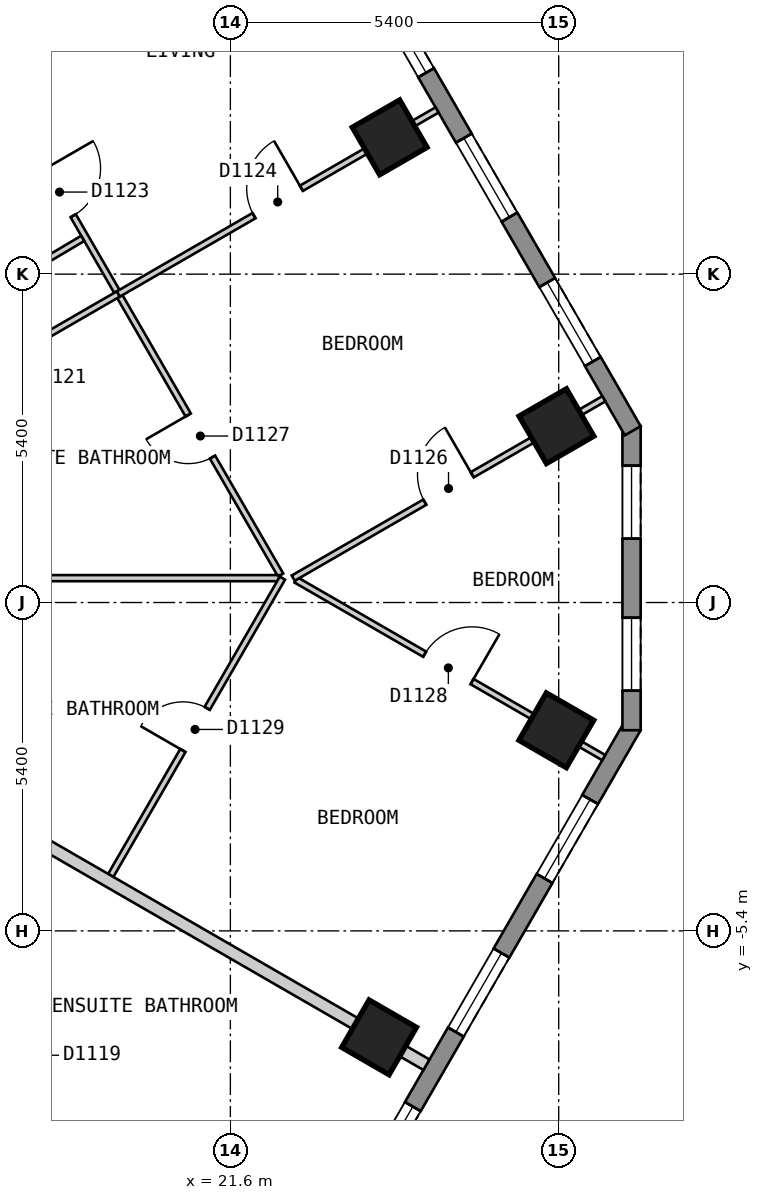
"""IFC4 building model, lengths in metres.
Left out: names, types, materials, properties, quantities, classifications, styles, units other than length and angle.
Written with IfcOpenShell. Run it as: python <this file> out.ifc"""

import sys

from ifc_helpers import new_model, si_unit, direction, frame, frame_2d, origin, origin_2d, place, context, subcontext, project, spatial, polyline, rectangle, outline, extrude, element, fill, save


model = new_model("IFC4")
c1 = context("Model", 3, precision=1e-05, world=origin(), true_north=direction((0.0, 1.0)))
c2 = subcontext(c1, "Body", "Model", "MODEL_VIEW")
j1 = project(units=[si_unit("LENGTHUNIT", "METRE"), si_unit("PLANEANGLEUNIT", "RADIAN")], contexts=[c1])
p1 = place(None, origin())
s1 = spatial("IfcSite", under=j1, at=p1, CompositionType="ELEMENT")
p2 = place(p1, origin())
s2 = spatial("IfcBuilding", under=s1, at=p2, CompositionType="ELEMENT")
p3 = place(p2, frame((0.0, 0.0, 150.6)))
s3 = spatial("IfcBuildingStorey", under=s2, at=p3, CompositionType="ELEMENT", Elevation=150.6)
for number, where, z_axis, x_axis in (
    (1, (24.046, -7.151, 0.0), (0.0, 0.0, 1.0), (0.5, 0.866, 0.0)),
    (2, (26.961, -2.101, 0.0), (0.0, 0.0, 1.0), (0.5, 0.866, 0.0)),
    (3, (26.963, 2.9, 0.0), (0.0, 0.0, 1.0), (-0.5, 0.866, 0.0)),
    (4, (24.22, 7.65, 0.0), (0.0, 0.0, 1.0), (-0.5, 0.866, 0.0)),
):
    element("IfcColumn", number, at=place(p3, frame(where, z_axis=z_axis, x_axis=x_axis)), inside=s3, PredefinedType="COLUMN", context=c2, shape_type="SweptSolid", body=[
        extrude(rectangle(XDim=0.9, YDim=0.9, at=origin_2d()), origin(), (0.0, 0.0, 1.0), 3.0),
    ])
p4 = place(p3, frame((15.862, -23.425, 0.0), z_axis=(0.0, 0.0, 1.0), x_axis=(0.500017503135, 0.866015298109, 0.0)))
e5 = element("IfcWall", 5, at=p4, inside=s3, PredefinedType="SOLIDWALL", context=c2, shape_type="SweptSolid", body=[
    extrude(outline(polyline([(0.0, -0.15), (24.711, -0.15), (24.631, 0.15), (0.08, 0.15), (0.0, -0.15)])), origin(), (0.0, 0.0, 1.0), 2.6),
])
p5 = place(p4, frame((1.4, 0.0, 0.15)))
e6 = element("IfcOpeningElement", 6, at=p5, cuts=e5, PredefinedType="OPENING", context=c2, shape_type="SweptSolid", body=[
    extrude(rectangle(XDim=1.5, YDim=2.1, at=frame_2d((0.75, 1.05))), frame((0.0, 0.16, 0.0), z_axis=(0.0, -1.0, 0.0), x_axis=(1.0, 0.0, 0.0)), (0.0, 0.0, 1.0), 0.32),
])
p6 = place(p4, frame((4.316, 0.0, 0.15)))
e7 = element("IfcOpeningElement", 7, at=p6, cuts=e5, PredefinedType="OPENING", context=c2, shape_type="SweptSolid", body=[
    extrude(rectangle(XDim=1.5, YDim=2.1, at=frame_2d((0.75, 1.05))), frame((0.0, 0.16, 0.0), z_axis=(0.0, -1.0, 0.0), x_axis=(1.0, 0.0, 0.0)), (0.0, 0.0, 1.0), 0.32),
])
p7 = place(p4, frame((7.231, 0.0, 0.15)))
e8 = element("IfcOpeningElement", 8, at=p7, cuts=e5, PredefinedType="OPENING", context=c2, shape_type="SweptSolid", body=[
    extrude(rectangle(XDim=1.5, YDim=2.1, at=frame_2d((0.75, 1.05))), frame((0.0, 0.16, 0.0), z_axis=(0.0, -1.0, 0.0), x_axis=(1.0, 0.0, 0.0)), (0.0, 0.0, 1.0), 0.32),
])
p8 = place(p4, frame((10.147, 0.0, 0.15)))
e9 = element("IfcOpeningElement", 9, at=p8, cuts=e5, PredefinedType="OPENING", context=c2, shape_type="SweptSolid", body=[
    extrude(rectangle(XDim=1.5, YDim=2.1, at=frame_2d((0.75, 1.05))), frame((0.0, 0.16, 0.0), z_axis=(0.0, -1.0, 0.0), x_axis=(1.0, 0.0, 0.0)), (0.0, 0.0, 1.0), 0.32),
])
p9 = place(p4, frame((13.062, 0.0, 0.15)))
e10 = element("IfcOpeningElement", 10, at=p9, cuts=e5, PredefinedType="OPENING", context=c2, shape_type="SweptSolid", body=[
    extrude(rectangle(XDim=1.5, YDim=2.1, at=frame_2d((0.75, 1.05))), frame((0.0, 0.16, 0.0), z_axis=(0.0, -1.0, 0.0), x_axis=(1.0, 0.0, 0.0)), (0.0, 0.0, 1.0), 0.32),
])
p10 = place(p4, frame((15.977, 0.0, 0.15)))
e11 = element("IfcOpeningElement", 11, at=p10, cuts=e5, PredefinedType="OPENING", context=c2, shape_type="SweptSolid", body=[
    extrude(rectangle(XDim=1.5, YDim=2.1, at=frame_2d((0.75, 1.05))), frame((0.0, 0.16, 0.0), z_axis=(0.0, -1.0, 0.0), x_axis=(1.0, 0.0, 0.0)), (0.0, 0.0, 1.0), 0.32),
])
p11 = place(p4, frame((18.893, 0.0, 0.15)))
e12 = element("IfcOpeningElement", 12, at=p11, cuts=e5, PredefinedType="OPENING", context=c2, shape_type="SweptSolid", body=[
    extrude(rectangle(XDim=1.5, YDim=2.1, at=frame_2d((0.75, 1.05))), frame((0.0, 0.16, 0.0), z_axis=(0.0, -1.0, 0.0), x_axis=(1.0, 0.0, 0.0)), (0.0, 0.0, 1.0), 0.32),
])
p12 = place(p4, frame((21.809, 0.0, 0.15)))
e13 = element("IfcOpeningElement", 13, at=p12, cuts=e5, PredefinedType="OPENING", context=c2, shape_type="SweptSolid", body=[
    extrude(rectangle(XDim=1.5, YDim=2.1, at=frame_2d((0.75, 1.05))), frame((0.0, 0.16, 0.0), z_axis=(0.0, -1.0, 0.0), x_axis=(1.0, 0.0, 0.0)), (0.0, 0.0, 1.0), 0.32),
])
p13 = place(p3, frame((28.198, -2.1, 0.0), z_axis=(0.0, 0.0, 1.0), x_axis=(0.0, 1.0, 0.0)))
e14 = element("IfcWall", 14, at=p13, inside=s3, PredefinedType="SOLIDWALL", context=c2, shape_type="SweptSolid", body=[
    extrude(outline(polyline([(0.0, -0.15), (5.0, -0.15), (4.92, 0.15), (0.08, 0.15), (0.0, -0.15)])), origin(), (0.0, 0.0, 1.0), 2.6),
])
p14 = place(p13, frame((0.65, 0.0, 0.15)))
e15 = element("IfcOpeningElement", 15, at=p14, cuts=e14, PredefinedType="OPENING", context=c2, shape_type="SweptSolid", body=[
    extrude(rectangle(XDim=1.2, YDim=2.1, at=frame_2d((0.6, 1.05))), frame((0.0, 0.16, 0.0), z_axis=(0.0, -1.0, 0.0), x_axis=(1.0, 0.0, 0.0)), (0.0, 0.0, 1.0), 0.32),
])
p15 = place(p13, frame((3.15, 0.0, 0.15)))
e16 = element("IfcOpeningElement", 16, at=p15, cuts=e14, PredefinedType="OPENING", context=c2, shape_type="SweptSolid", body=[
    extrude(rectangle(XDim=1.2, YDim=2.1, at=frame_2d((0.6, 1.05))), frame((0.0, 0.16, 0.0), z_axis=(0.0, -1.0, 0.0), x_axis=(1.0, 0.0, 0.0)), (0.0, 0.0, 1.0), 0.32),
])
p16 = place(p3, frame((28.218, 2.825, 0.0), z_axis=(0.0, 0.0, 1.0), x_axis=(-0.500020536353, 0.866013546791, 0.0)))
e17 = element("IfcWall", 17, at=p16, inside=s3, PredefinedType="SOLIDWALL", context=c2, shape_type="SweptSolid", body=[
    extrude(outline(polyline([(0.0, -0.15), (23.325, -0.15), (23.245, 0.15), (0.08, 0.15), (0.0, -0.15)])), origin(), (0.0, 0.0, 1.0), 2.6),
])
p17 = place(p16, frame((1.314, 0.0, 0.15)))
e18 = element("IfcOpeningElement", 18, at=p17, cuts=e17, PredefinedType="OPENING", context=c2, shape_type="SweptSolid", body=[
    extrude(rectangle(XDim=1.5, YDim=2.1, at=frame_2d((0.75, 1.05))), frame((0.0, 0.16, 0.0), z_axis=(0.0, -1.0, 0.0), x_axis=(1.0, 0.0, 0.0)), (0.0, 0.0, 1.0), 0.32),
])
p18 = place(p16, frame((4.056, 0.0, 0.15)))
e19 = element("IfcOpeningElement", 19, at=p18, cuts=e17, PredefinedType="OPENING", context=c2, shape_type="SweptSolid", body=[
    extrude(rectangle(XDim=1.5, YDim=2.1, at=frame_2d((0.75, 1.05))), frame((0.0, 0.16, 0.0), z_axis=(0.0, -1.0, 0.0), x_axis=(1.0, 0.0, 0.0)), (0.0, 0.0, 1.0), 0.32),
])
p19 = place(p16, frame((6.798, 0.0, 0.15)))
e20 = element("IfcOpeningElement", 20, at=p19, cuts=e17, PredefinedType="OPENING", context=c2, shape_type="SweptSolid", body=[
    extrude(rectangle(XDim=1.5, YDim=2.1, at=frame_2d((0.75, 1.05))), frame((0.0, 0.16, 0.0), z_axis=(0.0, -1.0, 0.0), x_axis=(1.0, 0.0, 0.0)), (0.0, 0.0, 1.0), 0.32),
])
p20 = place(p16, frame((9.541, 0.0, 0.15)))
e21 = element("IfcOpeningElement", 21, at=p20, cuts=e17, PredefinedType="OPENING", context=c2, shape_type="SweptSolid", body=[
    extrude(rectangle(XDim=1.5, YDim=2.1, at=frame_2d((0.75, 1.05))), frame((0.0, 0.16, 0.0), z_axis=(0.0, -1.0, 0.0), x_axis=(1.0, 0.0, 0.0)), (0.0, 0.0, 1.0), 0.32),
])
p21 = place(p16, frame((12.284, 0.0, 0.15)))
e22 = element("IfcOpeningElement", 22, at=p21, cuts=e17, PredefinedType="OPENING", context=c2, shape_type="SweptSolid", body=[
    extrude(rectangle(XDim=1.5, YDim=2.1, at=frame_2d((0.75, 1.05))), frame((0.0, 0.16, 0.0), z_axis=(0.0, -1.0, 0.0), x_axis=(1.0, 0.0, 0.0)), (0.0, 0.0, 1.0), 0.32),
])
p22 = place(p16, frame((15.027, 0.0, 0.15)))
e23 = element("IfcOpeningElement", 23, at=p22, cuts=e17, PredefinedType="OPENING", context=c2, shape_type="SweptSolid", body=[
    extrude(rectangle(XDim=1.5, YDim=2.1, at=frame_2d((0.75, 1.05))), frame((0.0, 0.16, 0.0), z_axis=(0.0, -1.0, 0.0), x_axis=(1.0, 0.0, 0.0)), (0.0, 0.0, 1.0), 0.32),
])
p23 = place(p16, frame((17.769, 0.0, 0.15)))
e24 = element("IfcOpeningElement", 24, at=p23, cuts=e17, PredefinedType="OPENING", context=c2, shape_type="SweptSolid", body=[
    extrude(rectangle(XDim=1.5, YDim=2.1, at=frame_2d((0.75, 1.05))), frame((0.0, 0.16, 0.0), z_axis=(0.0, -1.0, 0.0), x_axis=(1.0, 0.0, 0.0)), (0.0, 0.0, 1.0), 0.32),
])
p24 = place(p16, frame((20.511, 0.0, 0.15)))
e25 = element("IfcOpeningElement", 25, at=p24, cuts=e17, PredefinedType="OPENING", context=c2, shape_type="SweptSolid", body=[
    extrude(rectangle(XDim=1.5, YDim=2.1, at=frame_2d((0.75, 1.05))), frame((0.0, 0.16, 0.0), z_axis=(0.0, -1.0, 0.0), x_axis=(1.0, 0.0, 0.0)), (0.0, 0.0, 1.0), 0.32),
])
p25 = place(p3, frame((14.323, 14.487, 0.0), z_axis=(0.0, 0.0, 1.0), x_axis=(0.500011052545, -0.866019022501, 0.0)))
e26 = element("IfcWall", 26, at=p25, inside=s3, PredefinedType="PARTITIONING", context=c2, shape_type="SweptSolid", body=[
    extrude(rectangle(XDim=16.208, YDim=0.1, at=frame_2d((8.104, 0.0))), origin(), (0.0, 0.0, 1.0), 2.6),
])
p26 = place(p25, frame((8.484, 0.0, 0.0)))
e27 = element("IfcOpeningElement", 27, at=p26, cuts=e26, PredefinedType="OPENING", context=c2, shape_type="SweptSolid", body=[
    extrude(rectangle(XDim=0.9, YDim=2.1, at=frame_2d((0.45, 1.05))), frame((0.0, 0.06, 0.0), z_axis=(0.0, -1.0, 0.0), x_axis=(1.0, 0.0, 0.0)), (0.0, 0.0, 1.0), 0.12),
])
p27 = place(p25, frame((2.252, 0.0, 0.0)))
e28 = element("IfcOpeningElement", 28, at=p27, cuts=e26, PredefinedType="OPENING", context=c2, shape_type="SweptSolid", body=[
    extrude(rectangle(XDim=0.8, YDim=2.1, at=frame_2d((0.4, 1.05))), frame((0.0, 0.06, 0.0), z_axis=(0.0, -1.0, 0.0), x_axis=(1.0, 0.0, 0.0)), (0.0, 0.0, 1.0), 0.12),
])
p28 = place(p25, frame((13.167, 0.0, 0.0)))
e29 = element("IfcOpeningElement", 29, at=p28, cuts=e26, PredefinedType="OPENING", context=c2, shape_type="SweptSolid", body=[
    extrude(rectangle(XDim=0.8, YDim=2.1, at=frame_2d((0.4, 1.05))), frame((0.0, 0.06, 0.0), z_axis=(0.0, -1.0, 0.0), x_axis=(1.0, 0.0, 0.0)), (0.0, 0.0, 1.0), 0.12),
])
p29 = place(p3, frame((22.679, 0.372, 0.0), z_axis=(0.0, 0.0, 1.0), x_axis=(0.865985260119, -0.500069524424, 0.0)))
e30 = element("IfcWall", 30, at=p29, inside=s3, PredefinedType="PARTITIONING", context=c2, shape_type="SweptSolid", body=[
    extrude(rectangle(XDim=5.845, YDim=0.1, at=frame_2d((2.923, 0.0))), origin(), (0.0, 0.0, 1.0), 2.6),
])
p30 = place(p29, frame((2.444, 0.0, 0.0)))
e31 = element("IfcOpeningElement", 31, at=p30, cuts=e30, PredefinedType="OPENING", context=c2, shape_type="SweptSolid", body=[
    extrude(rectangle(XDim=0.9, YDim=2.1, at=frame_2d((0.45, 1.05))), frame((0.0, 0.06, 0.0), z_axis=(0.0, -1.0, 0.0), x_axis=(1.0, 0.0, 0.0)), (0.0, 0.0, 1.0), 0.12),
])
p31 = place(p3, frame((17.782, 0.401, 0.0), z_axis=(0.0, 0.0, 1.0), x_axis=(1.0, 0.0, 0.0)))
e32 = element("IfcWall", 32, at=p31, inside=s3, PredefinedType="PARTITIONING", context=c2, shape_type="SweptSolid", body=[
    extrude(rectangle(XDim=4.616, YDim=0.1, at=frame_2d((2.308, 0.0))), origin(), (0.0, 0.0, 1.0), 2.6),
])
p32 = place(p3, frame((19.633, -4.488, 0.0), z_axis=(0.0, 0.0, 1.0), x_axis=(0.500050624552, 0.865996173713, 0.0)))
e33 = element("IfcWall", 33, at=p32, inside=s3, PredefinedType="PARTITIONING", context=c2, shape_type="SweptSolid", body=[
    extrude(rectangle(XDim=5.646, YDim=0.1, at=frame_2d((2.823, 0.0))), origin(), (0.0, 0.0, 1.0), 2.6),
])
p33 = place(p32, frame((2.372, 0.0, 0.0)))
e34 = element("IfcOpeningElement", 34, at=p33, cuts=e33, PredefinedType="OPENING", context=c2, shape_type="SweptSolid", body=[
    extrude(rectangle(XDim=0.8, YDim=2.1, at=frame_2d((0.4, 1.05))), frame((0.0, 0.06, 0.0), z_axis=(0.0, -1.0, 0.0), x_axis=(1.0, 0.0, 0.0)), (0.0, 0.0, 1.0), 0.12),
])
p34 = place(p3, frame((16.339, 3.1, 0.0), z_axis=(0.0, 0.0, 1.0), x_axis=(0.866031112038, 0.499990112884, 0.0)))
e35 = element("IfcWall", 35, at=p34, inside=s3, PredefinedType="PARTITIONING", context=c2, shape_type="SweptSolid", body=[
    extrude(rectangle(XDim=3.948, YDim=0.1, at=frame_2d((1.974, 0.0))), origin(), (0.0, 0.0, 1.0), 2.6),
])
p35 = place(p3, frame((22.634, 0.401, 0.0), z_axis=(0.0, 0.0, 1.0), x_axis=(0.86601325737, 0.500021037617, 0.0)))
e36 = element("IfcWall", 36, at=p35, inside=s3, PredefinedType="PARTITIONING", context=c2, shape_type="SweptSolid", body=[
    extrude(rectangle(XDim=5.898, YDim=0.1, at=frame_2d((2.949, 0.0))), origin(), (0.0, 0.0, 1.0), 2.6),
])
p36 = place(p35, frame((2.499, 0.0, 0.0)))
e37 = element("IfcOpeningElement", 37, at=p36, cuts=e36, PredefinedType="OPENING", context=c2, shape_type="SweptSolid", body=[
    extrude(rectangle(XDim=0.9, YDim=2.1, at=frame_2d((0.45, 1.05))), frame((0.0, 0.06, 0.0), z_axis=(0.0, -1.0, 0.0), x_axis=(1.0, 0.0, 0.0)), (0.0, 0.0, 1.0), 0.12),
])
p37 = place(p3, frame((15.818, 4.002, 0.0), z_axis=(0.0, 0.0, 1.0), x_axis=(0.860457323494, 0.509522516132, 0.0)))
e38 = element("IfcWall", 38, at=p37, inside=s3, PredefinedType="PARTITIONING", context=c2, shape_type="SweptSolid", body=[
    extrude(rectangle(XDim=3.898, YDim=0.1, at=frame_2d((1.949, 0.0))), origin(), (0.0, 0.0, 1.0), 2.6),
])
p38 = place(p37, frame((1.524, 0.0, 0.0)))
e39 = element("IfcOpeningElement", 39, at=p38, cuts=e38, PredefinedType="OPENING", context=c2, shape_type="SweptSolid", body=[
    extrude(rectangle(XDim=0.8, YDim=2.1, at=frame_2d((0.4, 1.05))), frame((0.0, 0.06, 0.0), z_axis=(0.0, -1.0, 0.0), x_axis=(1.0, 0.0, 0.0)), (0.0, 0.0, 1.0), 0.12),
])
p39 = place(p3, frame((16.165, -2.601, 0.0), z_axis=(0.0, 0.0, 1.0), x_axis=(0.866016855193, -0.500014806302, 0.0)))
e40 = element("IfcWall", 40, at=p39, inside=s3, PredefinedType="PARTITIONING", context=c2, shape_type="SweptSolid", body=[
    extrude(rectangle(XDim=10.0, YDim=0.2, at=frame_2d((5.0, 0.0))), origin(), (0.0, 0.0, 1.0), 2.6),
])
p40 = place(p3, frame((19.758, 5.074, 0.0), z_axis=(0.0, 0.0, 1.0), x_axis=(0.866007554612, 0.500030914399, 0.0)))
e41 = element("IfcWall", 41, at=p40, inside=s3, PredefinedType="PARTITIONING", context=c2, shape_type="SweptSolid", body=[
    extrude(rectangle(XDim=6.052, YDim=0.1, at=frame_2d((3.026, 0.0))), origin(), (0.0, 0.0, 1.0), 2.6),
])
p41 = place(p40, frame((2.576, 0.0, 0.0)))
e42 = element("IfcOpeningElement", 42, at=p41, cuts=e41, PredefinedType="OPENING", context=c2, shape_type="SweptSolid", body=[
    extrude(rectangle(XDim=0.9, YDim=2.1, at=frame_2d((0.45, 1.05))), frame((0.0, 0.06, 0.0), z_axis=(0.0, -1.0, 0.0), x_axis=(1.0, 0.0, 0.0)), (0.0, 0.0, 1.0), 0.12),
])
p42 = place(p10, origin())
e43 = element("IfcWindow", 43, at=p42, inside=s3, PartitioningType="SINGLE_PANEL", PredefinedType="WINDOW", context=c2, shape_type="SweptSolid", body=[
    extrude(rectangle(XDim=1.5, YDim=2.1, at=frame_2d((0.75, 1.05))), frame((0.0, 0.03, 0.0), z_axis=(0.0, -1.0, 0.0), x_axis=(1.0, 0.0, 0.0)), (0.0, 0.0, 1.0), 0.06),
])
fill(e11, e43)
p43 = place(p11, origin())
e44 = element("IfcWindow", 44, at=p43, inside=s3, PartitioningType="SINGLE_PANEL", PredefinedType="WINDOW", context=c2, shape_type="SweptSolid", body=[
    extrude(rectangle(XDim=1.5, YDim=2.1, at=frame_2d((0.75, 1.05))), frame((0.0, 0.03, 0.0), z_axis=(0.0, -1.0, 0.0), x_axis=(1.0, 0.0, 0.0)), (0.0, 0.0, 1.0), 0.06),
])
fill(e12, e44)
p44 = place(p12, origin())
e45 = element("IfcWindow", 45, at=p44, inside=s3, PartitioningType="SINGLE_PANEL", PredefinedType="WINDOW", context=c2, shape_type="SweptSolid", body=[
    extrude(rectangle(XDim=1.5, YDim=2.1, at=frame_2d((0.75, 1.05))), frame((0.0, 0.03, 0.0), z_axis=(0.0, -1.0, 0.0), x_axis=(1.0, 0.0, 0.0)), (0.0, 0.0, 1.0), 0.06),
])
fill(e13, e45)
p45 = place(p14, origin())
e46 = element("IfcWindow", 46, at=p45, inside=s3, PartitioningType="SINGLE_PANEL", PredefinedType="WINDOW", context=c2, shape_type="SweptSolid", body=[
    extrude(rectangle(XDim=1.2, YDim=2.1, at=frame_2d((0.6, 1.05))), frame((0.0, 0.03, 0.0), z_axis=(0.0, -1.0, 0.0), x_axis=(1.0, 0.0, 0.0)), (0.0, 0.0, 1.0), 0.06),
])
fill(e15, e46)
p46 = place(p15, origin())
e47 = element("IfcWindow", 47, at=p46, inside=s3, PartitioningType="SINGLE_PANEL", PredefinedType="WINDOW", context=c2, shape_type="SweptSolid", body=[
    extrude(rectangle(XDim=1.2, YDim=2.1, at=frame_2d((0.6, 1.05))), frame((0.0, 0.03, 0.0), z_axis=(0.0, -1.0, 0.0), x_axis=(1.0, 0.0, 0.0)), (0.0, 0.0, 1.0), 0.06),
])
fill(e16, e47)
p47 = place(p17, origin())
e48 = element("IfcWindow", 48, at=p47, inside=s3, PartitioningType="SINGLE_PANEL", PredefinedType="WINDOW", context=c2, shape_type="SweptSolid", body=[
    extrude(rectangle(XDim=1.5, YDim=2.1, at=frame_2d((0.75, 1.05))), frame((0.0, 0.03, 0.0), z_axis=(0.0, -1.0, 0.0), x_axis=(1.0, 0.0, 0.0)), (0.0, 0.0, 1.0), 0.06),
])
fill(e18, e48)
p48 = place(p18, origin())
e49 = element("IfcWindow", 49, at=p48, inside=s3, PartitioningType="SINGLE_PANEL", PredefinedType="WINDOW", context=c2, shape_type="SweptSolid", body=[
    extrude(rectangle(XDim=1.5, YDim=2.1, at=frame_2d((0.75, 1.05))), frame((0.0, 0.03, 0.0), z_axis=(0.0, -1.0, 0.0), x_axis=(1.0, 0.0, 0.0)), (0.0, 0.0, 1.0), 0.06),
])
fill(e19, e49)
p49 = place(p19, origin())
e50 = element("IfcWindow", 50, at=p49, inside=s3, PartitioningType="SINGLE_PANEL", PredefinedType="WINDOW", context=c2, shape_type="SweptSolid", body=[
    extrude(rectangle(XDim=1.5, YDim=2.1, at=frame_2d((0.75, 1.05))), frame((0.0, 0.03, 0.0), z_axis=(0.0, -1.0, 0.0), x_axis=(1.0, 0.0, 0.0)), (0.0, 0.0, 1.0), 0.06),
])
fill(e20, e50)
p50 = place(p26, origin())
e51 = element("IfcDoor", 51, at=p50, inside=s3, OperationType="SINGLE_SWING_LEFT", PredefinedType="DOOR", context=c2, shape_type="SweptSolid", body=[
    extrude(rectangle(XDim=0.9, YDim=2.1, at=frame_2d((0.45, 1.05))), frame((0.0, 0.025, 0.0), z_axis=(0.0, -1.0, 0.0), x_axis=(1.0, 0.0, 0.0)), (0.0, 0.0, 1.0), 0.05),
])
fill(e27, e51)
p51 = place(p41, origin())
e52 = element("IfcDoor", 52, at=p51, inside=s3, OperationType="SINGLE_SWING_RIGHT", PredefinedType="DOOR", context=c2, shape_type="SweptSolid", body=[
    extrude(rectangle(XDim=0.9, YDim=2.1, at=frame_2d((0.45, 1.05))), frame((0.0, 0.025, 0.0), z_axis=(0.0, -1.0, 0.0), x_axis=(1.0, 0.0, 0.0)), (0.0, 0.0, 1.0), 0.05),
])
fill(e42, e52)
p52 = place(p36, origin())
e53 = element("IfcDoor", 53, at=p52, inside=s3, OperationType="SINGLE_SWING_RIGHT", PredefinedType="DOOR", context=c2, shape_type="SweptSolid", body=[
    extrude(rectangle(XDim=0.9, YDim=2.1, at=frame_2d((0.45, 1.05))), frame((0.0, 0.025, 0.0), z_axis=(0.0, -1.0, 0.0), x_axis=(1.0, 0.0, 0.0)), (0.0, 0.0, 1.0), 0.05),
])
fill(e37, e53)
p53 = place(p28, origin())
e54 = element("IfcDoor", 54, at=p53, inside=s3, OperationType="SINGLE_SWING_LEFT", PredefinedType="DOOR", context=c2, shape_type="SweptSolid", body=[
    extrude(rectangle(XDim=0.8, YDim=2.1, at=frame_2d((0.4, 1.05))), frame((0.0, 0.025, 0.0), z_axis=(0.0, -1.0, 0.0), x_axis=(1.0, 0.0, 0.0)), (0.0, 0.0, 1.0), 0.05),
])
fill(e29, e54)
p54 = place(p30, origin())
e55 = element("IfcDoor", 55, at=p54, inside=s3, OperationType="SINGLE_SWING_RIGHT", PredefinedType="DOOR", context=c2, shape_type="SweptSolid", body=[
    extrude(rectangle(XDim=0.9, YDim=2.1, at=frame_2d((0.45, 1.05))), frame((0.0, 0.025, 0.0), z_axis=(0.0, -1.0, 0.0), x_axis=(1.0, 0.0, 0.0)), (0.0, 0.0, 1.0), 0.05),
])
fill(e31, e55)
p55 = place(p33, origin())
e56 = element("IfcDoor", 56, at=p55, inside=s3, OperationType="SINGLE_SWING_LEFT", PredefinedType="DOOR", context=c2, shape_type="SweptSolid", body=[
    extrude(rectangle(XDim=0.8, YDim=2.1, at=frame_2d((0.4, 1.05))), frame((0.0, 0.025, 0.0), z_axis=(0.0, -1.0, 0.0), x_axis=(1.0, 0.0, 0.0)), (0.0, 0.0, 1.0), 0.05),
])
fill(e34, e56)
save(model, sys.argv[1])
